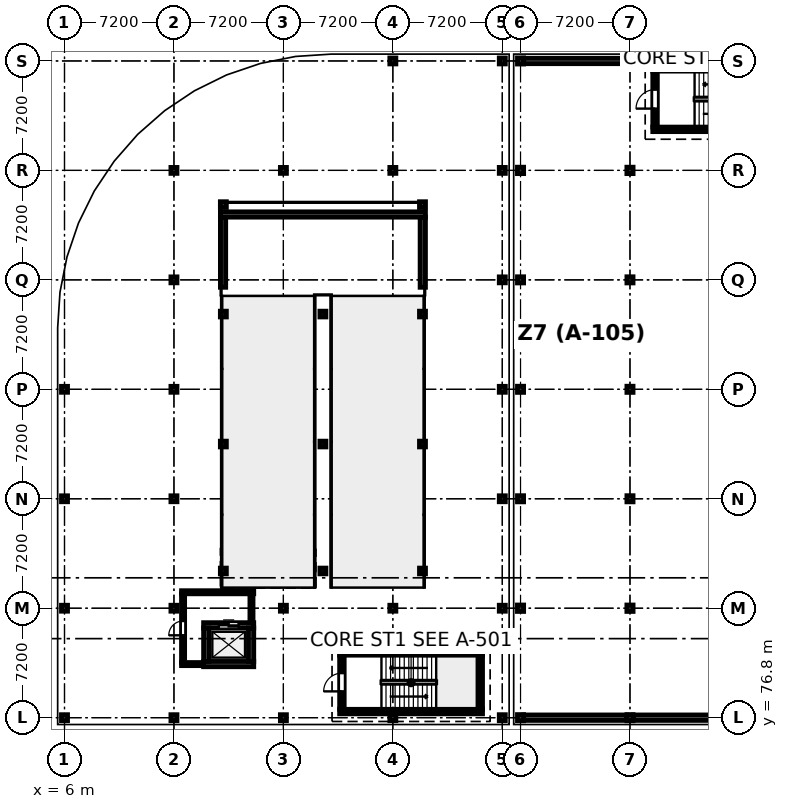
"""IFC4 building model, lengths in metres.
Left out: names, types, materials, properties, quantities, classifications, styles, units other than length and angle.
Written with IfcOpenShell. Run it as: python <this file> out.ifc"""

import sys

from ifc_helpers import new_model, si_unit, direction, frame, frame_2d, origin, origin_2d, place, context, subcontext, project, spatial, rectangle, i_section, extrude, element, fill, save


model = new_model("IFC4")
c1 = context("Model", 3, precision=1e-05, world=origin(), true_north=direction((0.0, 1.0)))
c2 = subcontext(c1, "Body", "Model", "MODEL_VIEW")
j1 = project(units=[si_unit("LENGTHUNIT", "METRE"), si_unit("PLANEANGLEUNIT", "RADIAN")], contexts=[c1])
p1 = place(None, origin())
s1 = spatial("IfcSite", under=j1, at=p1, CompositionType="ELEMENT")
p2 = place(p1, origin())
s2 = spatial("IfcBuilding", under=s1, at=p2, CompositionType="ELEMENT")
p3 = place(p2, frame((0.0, 0.0, -4.5)))
s3 = spatial("IfcBuildingStorey", under=s2, at=p3, CompositionType="ELEMENT", Elevation=-4.5)
for number, where, z_axis, x_axis in (
    (1, (6.0, 76.8, 0.0), (0.0, 0.0, 1.0), (1.0, 0.0, 0.0)),
    (2, (6.0, 84.0, 0.0), (0.0, 0.0, 1.0), (1.0, 0.0, 0.0)),
    (3, (6.0, 91.2, 0.0), (0.0, 0.0, 1.0), (1.0, 0.0, 0.0)),
    (4, (6.0, 98.4, 0.0), (0.0, 0.0, 1.0), (1.0, 0.0, 0.0)),
    (5, (13.2, 76.8, 0.0), (0.0, 0.0, 1.0), (1.0, 0.0, 0.0)),
    (6, (13.2, 84.0, 0.0), (0.0, 0.0, 1.0), (1.0, 0.0, 0.0)),
    (7, (13.2, 91.2, 0.0), (0.0, 0.0, 1.0), (1.0, 0.0, 0.0)),
    (8, (13.2, 98.4, 0.0), (0.0, 0.0, 1.0), (1.0, 0.0, 0.0)),
    (9, (13.2, 105.6, 0.0), (0.0, 0.0, 1.0), (1.0, 0.0, 0.0)),
    (10, (13.2, 112.8, 0.0), (0.0, 0.0, 1.0), (1.0, 0.0, 0.0)),
    (11, (20.4, 76.8, 0.0), (0.0, 0.0, 1.0), (1.0, 0.0, 0.0)),
    (12, (20.4, 84.0, 0.0), (0.0, 0.0, 1.0), (1.0, 0.0, 0.0)),
    (13, (20.4, 112.8, 0.0), (0.0, 0.0, 1.0), (1.0, 0.0, 0.0)),
    (14, (27.6, 76.8, 0.0), (0.0, 0.0, 1.0), (1.0, 0.0, 0.0)),
    (15, (27.6, 84.0, 0.0), (0.0, 0.0, 1.0), (1.0, 0.0, 0.0)),
    (16, (27.6, 112.8, 0.0), (0.0, 0.0, 1.0), (1.0, 0.0, 0.0)),
    (17, (27.6, 120.0, 0.0), (0.0, 0.0, 1.0), (1.0, 0.0, 0.0)),
    (18, (34.8, 76.8, 0.0), (0.0, 0.0, 1.0), (1.0, 0.0, 0.0)),
    (19, (34.8, 84.0, 0.0), (0.0, 0.0, 1.0), (1.0, 0.0, 0.0)),
    (20, (34.8, 91.2, 0.0), (0.0, 0.0, 1.0), (1.0, 0.0, 0.0)),
    (21, (34.8, 98.4, 0.0), (0.0, 0.0, 1.0), (1.0, 0.0, 0.0)),
    (22, (34.8, 105.6, 0.0), (0.0, 0.0, 1.0), (1.0, 0.0, 0.0)),
    (23, (34.8, 112.8, 0.0), (0.0, 0.0, 1.0), (1.0, 0.0, 0.0)),
    (24, (34.8, 120.0, 0.0), (0.0, 0.0, 1.0), (1.0, 0.0, 0.0)),
):
    element("IfcColumn", number, at=place(p3, frame(where, z_axis=z_axis, x_axis=x_axis)), inside=s3, PredefinedType="COLUMN", context=c2, shape_type="SweptSolid", body=[
        extrude(i_section(OverallWidth=0.399, OverallDepth=0.394, WebThickness=0.023, FlangeThickness=0.037, FilletRadius=0.015, at=origin_2d()), origin(), (0.0, 0.0, 1.0), 4.5),
    ])
for number, where, z_axis, x_axis in (
    (25, (16.45, 86.45, 0.0), (0.0, 0.0, 1.0), (1.0, 0.0, 0.0)),
    (26, (23.0, 86.45, 0.0), (0.0, 0.0, 1.0), (1.0, 0.0, 0.0)),
    (27, (29.55, 86.45, 0.0), (0.0, 0.0, 1.0), (1.0, 0.0, 0.0)),
    (28, (16.45, 94.8, 0.0), (0.0, 0.0, 1.0), (1.0, 0.0, 0.0)),
    (29, (23.0, 94.8, 0.0), (0.0, 0.0, 1.0), (1.0, 0.0, 0.0)),
    (30, (29.55, 94.8, 0.0), (0.0, 0.0, 1.0), (1.0, 0.0, 0.0)),
    (31, (16.45, 103.35, 0.0), (0.0, 0.0, 1.0), (1.0, 0.0, 0.0)),
    (32, (23.0, 103.35, 0.0), (0.0, 0.0, 1.0), (1.0, 0.0, 0.0)),
    (33, (29.55, 103.35, 0.0), (0.0, 0.0, 1.0), (1.0, 0.0, 0.0)),
    (34, (16.45, 110.55, 0.0), (0.0, 0.0, 1.0), (1.0, 0.0, 0.0)),
    (35, (29.55, 110.55, 0.0), (0.0, 0.0, 1.0), (1.0, 0.0, 0.0)),
):
    element("IfcColumn", number, at=place(p3, frame(where, z_axis=z_axis, x_axis=x_axis)), inside=s3, PredefinedType="COLUMN", context=c2, shape_type="SweptSolid", body=[
        extrude(i_section(OverallWidth=0.396, OverallDepth=0.381, WebThickness=0.019, FlangeThickness=0.03, FilletRadius=0.015, at=origin_2d()), origin(), (0.0, 0.0, 1.0), 4.5),
    ])
p4 = place(p3, frame((36.0, 76.8, 0.0), z_axis=(0.0, 0.0, 1.0), x_axis=(1.0, 0.0, 0.0)))
e36 = element("IfcColumn", 36, at=p4, inside=s3, PredefinedType="COLUMN", context=c2, shape_type="SweptSolid", body=[
    extrude(i_section(OverallWidth=0.404, OverallDepth=0.406, WebThickness=0.027, FlangeThickness=0.044, FilletRadius=0.015, at=origin_2d()), origin(), (0.0, 0.0, 1.0), 4.5),
])
p5 = place(p3, frame((36.0, 84.0, 0.0), z_axis=(0.0, 0.0, 1.0), x_axis=(1.0, 0.0, 0.0)))
e37 = element("IfcColumn", 37, at=p5, inside=s3, PredefinedType="COLUMN", context=c2, shape_type="SweptSolid", body=[
    extrude(i_section(OverallWidth=0.409, OverallDepth=0.424, WebThickness=0.033, FlangeThickness=0.052, FilletRadius=0.015, at=origin_2d()), origin(), (0.0, 0.0, 1.0), 4.5),
])
for number, where, z_axis, x_axis in (
    (38, (36.0, 91.2, 0.0), (0.0, 0.0, 1.0), (1.0, 0.0, 0.0)),
    (39, (36.0, 98.4, 0.0), (0.0, 0.0, 1.0), (1.0, 0.0, 0.0)),
    (40, (36.0, 105.6, 0.0), (0.0, 0.0, 1.0), (1.0, 0.0, 0.0)),
):
    element("IfcColumn", number, at=place(p3, frame(where, z_axis=z_axis, x_axis=x_axis)), inside=s3, PredefinedType="COLUMN", context=c2, shape_type="SweptSolid", body=[
        extrude(i_section(OverallWidth=0.404, OverallDepth=0.406, WebThickness=0.027, FlangeThickness=0.044, FilletRadius=0.015, at=origin_2d()), origin(), (0.0, 0.0, 1.0), 4.5),
    ])
p6 = place(p3, frame((36.0, 112.8, 0.0), z_axis=(0.0, 0.0, 1.0), x_axis=(1.0, 0.0, 0.0)))
e41 = element("IfcColumn", 41, at=p6, inside=s3, PredefinedType="COLUMN", context=c2, shape_type="SweptSolid", body=[
    extrude(i_section(OverallWidth=0.409, OverallDepth=0.424, WebThickness=0.033, FlangeThickness=0.052, FilletRadius=0.015, at=origin_2d()), origin(), (0.0, 0.0, 1.0), 4.5),
])
for number, where, z_axis, x_axis in (
    (42, (36.0, 120.0, 0.0), (0.0, 0.0, 1.0), (1.0, 0.0, 0.0)),
    (43, (43.2, 76.8, 0.0), (0.0, 0.0, 1.0), (1.0, 0.0, 0.0)),
):
    element("IfcColumn", number, at=place(p3, frame(where, z_axis=z_axis, x_axis=x_axis)), inside=s3, PredefinedType="COLUMN", context=c2, shape_type="SweptSolid", body=[
        extrude(i_section(OverallWidth=0.404, OverallDepth=0.406, WebThickness=0.027, FlangeThickness=0.044, FilletRadius=0.015, at=origin_2d()), origin(), (0.0, 0.0, 1.0), 4.5),
    ])
p7 = place(p3, frame((43.2, 84.0, 0.0), z_axis=(0.0, 0.0, 1.0), x_axis=(1.0, 0.0, 0.0)))
e44 = element("IfcColumn", 44, at=p7, inside=s3, PredefinedType="COLUMN", context=c2, shape_type="SweptSolid", body=[
    extrude(i_section(OverallWidth=0.409, OverallDepth=0.424, WebThickness=0.033, FlangeThickness=0.052, FilletRadius=0.015, at=origin_2d()), origin(), (0.0, 0.0, 1.0), 4.5),
])
for number, where, z_axis, x_axis in (
    (45, (43.2, 91.2, 0.0), (0.0, 0.0, 1.0), (1.0, 0.0, 0.0)),
    (46, (43.2, 98.4, 0.0), (0.0, 0.0, 1.0), (1.0, 0.0, 0.0)),
    (47, (43.2, 105.6, 0.0), (0.0, 0.0, 1.0), (1.0, 0.0, 0.0)),
):
    element("IfcColumn", number, at=place(p3, frame(where, z_axis=z_axis, x_axis=x_axis)), inside=s3, PredefinedType="COLUMN", context=c2, shape_type="SweptSolid", body=[
        extrude(i_section(OverallWidth=0.404, OverallDepth=0.406, WebThickness=0.027, FlangeThickness=0.044, FilletRadius=0.015, at=origin_2d()), origin(), (0.0, 0.0, 1.0), 4.5),
    ])
p8 = place(p3, frame((43.2, 112.8, 0.0), z_axis=(0.0, 0.0, 1.0), x_axis=(1.0, 0.0, 0.0)))
e48 = element("IfcColumn", 48, at=p8, inside=s3, PredefinedType="COLUMN", context=c2, shape_type="SweptSolid", body=[
    extrude(i_section(OverallWidth=0.409, OverallDepth=0.424, WebThickness=0.033, FlangeThickness=0.052, FilletRadius=0.015, at=origin_2d()), origin(), (0.0, 0.0, 1.0), 4.5),
])
p9 = place(p3, frame((43.2, 120.0, 0.0), z_axis=(0.0, 0.0, 1.0), x_axis=(1.0, 0.0, 0.0)))
e49 = element("IfcColumn", 49, at=p9, inside=s3, PredefinedType="COLUMN", context=c2, shape_type="SweptSolid", body=[
    extrude(i_section(OverallWidth=0.404, OverallDepth=0.406, WebThickness=0.027, FlangeThickness=0.044, FilletRadius=0.015, at=origin_2d()), origin(), (0.0, 0.0, 1.0), 4.5),
])
for number, where, z_axis, x_axis in (
    (50, (16.43, 105.11, 0.0), (0.0, 0.0, 1.0), (0.0, 1.0, 0.0)),
    (51, (29.57, 105.11, 0.0), (0.0, 0.0, 1.0), (0.0, 1.0, 0.0)),
):
    element("IfcWall", number, at=place(p3, frame(where, z_axis=z_axis, x_axis=x_axis)), inside=s3, PredefinedType="SHEAR", context=c2, shape_type="SweptSolid", body=[
        extrude(rectangle(XDim=4.615, YDim=0.35, at=frame_2d((2.308, 0.0))), origin(), (0.0, 0.0, 1.0), 1.97),
    ])
p10 = place(p3, frame((16.255, 109.9, 0.0), z_axis=(0.0, 0.0, 1.0), x_axis=(1.0, 0.0, 0.0)))
e52 = element("IfcWall", 52, at=p10, inside=s3, PredefinedType="SHEAR", context=c2, shape_type="SweptSolid", body=[
    extrude(rectangle(XDim=13.49, YDim=0.35, at=frame_2d((6.745, 0.0))), origin(), (0.0, 0.0, 1.0), 1.97),
])
for number, where, z_axis, x_axis in (
    (53, (36.209, 120.0, 0.0), (0.0, 0.0, 1.0), (1.0, 0.0, 0.0)),
    (54, (42.991, 76.8, 0.0), (0.0, 0.0, 1.0), (-1.0, 0.0, 0.0)),
    (55, (43.409, 120.0, 0.0), (0.0, 0.0, 1.0), (1.0, 0.0, 0.0)),
    (56, (50.191, 76.8, 0.0), (0.0, 0.0, 1.0), (-1.0, 0.0, 0.0)),
):
    element("IfcWall", number, at=place(p3, frame(where, z_axis=z_axis, x_axis=x_axis)), inside=s3, PredefinedType="SOLIDWALL", context=c2, shape_type="SweptSolid", body=[
        extrude(rectangle(XDim=6.782, YDim=0.36, at=frame_2d((3.391, 0.0))), origin(), (0.0, 0.0, 1.0), 3.448),
    ])
for number, where, z_axis, x_axis in (
    (57, (33.5, 77.2, 0.0), (0.0, 0.0, 1.0), (-1.0, 0.0, 0.0)),
    (58, (24.1, 81.06, 0.0), (0.0, 0.0, 1.0), (1.0, 0.0, 0.0)),
):
    element("IfcWall", number, at=place(p3, frame(where, z_axis=z_axis, x_axis=x_axis)), inside=s3, PredefinedType="SOLIDWALL", context=c2, shape_type="SweptSolid", body=[
        extrude(rectangle(XDim=9.4, YDim=0.3, at=frame_2d((4.7, 0.0))), origin(), (0.0, 0.0, 1.0), 4.25),
    ])
p11 = place(p3, frame((24.25, 77.35, 0.0), z_axis=(0.0, 0.0, 1.0), x_axis=(0.0, 1.0, 0.0)))
e59 = element("IfcWall", 59, at=p11, inside=s3, PredefinedType="SOLIDWALL", context=c2, shape_type="SweptSolid", body=[
    extrude(rectangle(XDim=3.56, YDim=0.3, at=frame_2d((1.78, 0.0))), origin(), (0.0, 0.0, 1.0), 4.25),
])
p12 = place(p11, frame((1.18, 0.0, 0.0)))
e60 = element("IfcOpeningElement", 60, at=p12, cuts=e59, PredefinedType="OPENING", context=c2, shape_type="SweptSolid", body=[
    extrude(rectangle(XDim=1.2, YDim=2.2, at=frame_2d((0.6, 1.1))), frame((0.0, 0.16, 0.0), z_axis=(0.0, -1.0, 0.0), x_axis=(1.0, 0.0, 0.0)), (0.0, 0.0, 1.0), 0.32),
])
p13 = place(p3, frame((33.35, 80.91, 0.0), z_axis=(0.0, 0.0, 1.0), x_axis=(0.0, -1.0, 0.0)))
e61 = element("IfcWall", 61, at=p13, inside=s3, PredefinedType="SOLIDWALL", context=c2, shape_type="SweptSolid", body=[
    extrude(rectangle(XDim=3.56, YDim=0.3, at=frame_2d((1.78, 0.0))), origin(), (0.0, 0.0, 1.0), 4.25),
])
for number, where, z_axis, x_axis in (
    (62, (54.1, 115.5, 0.0), (0.0, 0.0, 1.0), (-1.0, 0.0, 0.0)),
    (63, (44.7, 119.48, 0.0), (0.0, 0.0, 1.0), (1.0, 0.0, 0.0)),
):
    element("IfcWall", number, at=place(p3, frame(where, z_axis=z_axis, x_axis=x_axis)), inside=s3, PredefinedType="SOLIDWALL", context=c2, shape_type="SweptSolid", body=[
        extrude(rectangle(XDim=9.4, YDim=0.3, at=frame_2d((4.7, 0.0))), origin(), (0.0, 0.0, 1.0), 4.22),
    ])
p14 = place(p3, frame((44.85, 115.65, 0.0), z_axis=(0.0, 0.0, 1.0), x_axis=(0.0, 1.0, 0.0)))
e64 = element("IfcWall", 64, at=p14, inside=s3, PredefinedType="SOLIDWALL", context=c2, shape_type="SweptSolid", body=[
    extrude(rectangle(XDim=3.68, YDim=0.3, at=frame_2d((1.84, 0.0))), origin(), (0.0, 0.0, 1.0), 4.22),
])
p15 = place(p14, frame((1.215, 0.0, 0.0)))
e65 = element("IfcOpeningElement", 65, at=p15, cuts=e64, PredefinedType="OPENING", context=c2, shape_type="SweptSolid", body=[
    extrude(rectangle(XDim=1.25, YDim=2.2, at=frame_2d((0.625, 1.1))), frame((0.0, 0.16, 0.0), z_axis=(0.0, -1.0, 0.0), x_axis=(1.0, 0.0, 0.0)), (0.0, 0.0, 1.0), 0.32),
])
p16 = place(p3, frame((18.45, 80.325, 0.0), z_axis=(0.0, 0.0, 1.0), x_axis=(-1.0, 0.0, 0.0)))
e66 = element("IfcWall", 66, at=p16, inside=s3, PredefinedType="SHEAR", context=c2, shape_type="SweptSolid", body=[
    extrude(rectangle(XDim=3.3, YDim=0.35, at=frame_2d((1.65, 0.0))), origin(), (0.0, 0.0, 1.0), 4.25),
])
p17 = place(p3, frame((15.15, 82.875, 0.0), z_axis=(0.0, 0.0, 1.0), x_axis=(1.0, 0.0, 0.0)))
e67 = element("IfcWall", 67, at=p17, inside=s3, PredefinedType="SHEAR", context=c2, shape_type="SweptSolid", body=[
    extrude(rectangle(XDim=3.3, YDim=0.35, at=frame_2d((1.65, 0.0))), origin(), (0.0, 0.0, 1.0), 4.25),
])
p18 = place(p17, frame((1.0, 0.0, 0.0)))
e68 = element("IfcOpeningElement", 68, at=p18, cuts=e67, PredefinedType="OPENING", context=c2, shape_type="SweptSolid", body=[
    extrude(rectangle(XDim=1.3, YDim=2.2, at=frame_2d((0.65, 1.1))), frame((0.0, 0.185, 0.0), z_axis=(0.0, -1.0, 0.0), x_axis=(1.0, 0.0, 0.0)), (0.0, 0.0, 1.0), 0.37),
])
for number, where, z_axis, x_axis in (
    (69, (15.325, 80.5, 0.0), (0.0, 0.0, 1.0), (0.0, 1.0, 0.0)),
    (70, (18.275, 82.7, 0.0), (0.0, 0.0, 1.0), (0.0, -1.0, 0.0)),
):
    element("IfcWall", number, at=place(p3, frame(where, z_axis=z_axis, x_axis=x_axis)), inside=s3, PredefinedType="SHEAR", context=c2, shape_type="SweptSolid", body=[
        extrude(rectangle(XDim=2.2, YDim=0.35, at=frame_2d((1.1, 0.0))), origin(), (0.0, 0.0, 1.0), 4.25),
    ])
p19 = place(p3, frame((13.698, 85.05, 0.0), z_axis=(0.0, 0.0, 1.0), x_axis=(1.0, 0.0, 0.0)))
e71 = element("IfcWall", 71, at=p19, inside=s3, PredefinedType="PARTITIONING", context=c2, shape_type="SweptSolid", body=[
    extrude(rectangle(XDim=4.752, YDim=0.205, at=frame_2d((2.376, 0.0))), origin(), (0.0, 0.0, 1.0), 3.618),
])
p20 = place(p3, frame((15.148, 80.325, 0.0), z_axis=(0.0, 0.0, 1.0), x_axis=(-1.0, 0.0, 0.0)))
e72 = element("IfcWall", 72, at=p20, inside=s3, PredefinedType="PARTITIONING", context=c2, shape_type="SweptSolid", body=[
    extrude(rectangle(XDim=1.45, YDim=0.205, at=frame_2d((0.725, 0.0))), origin(), (0.0, 0.0, 1.0), 3.618),
])
p21 = place(p3, frame((13.8, 80.43, 0.0), z_axis=(0.0, 0.0, 1.0), x_axis=(0.0, 1.0, 0.0)))
e73 = element("IfcWall", 73, at=p21, inside=s3, PredefinedType="PARTITIONING", context=c2, shape_type="SweptSolid", body=[
    extrude(rectangle(XDim=4.516, YDim=0.205, at=frame_2d((2.258, 0.0))), origin(), (0.0, 0.0, 1.0), 3.618),
])
p22 = place(p21, frame((1.788, 0.0, 0.0)))
e74 = element("IfcOpeningElement", 74, at=p22, cuts=e73, PredefinedType="OPENING", context=c2, shape_type="SweptSolid", body=[
    extrude(rectangle(XDim=0.94, YDim=2.1, at=frame_2d((0.47, 1.05))), frame((0.0, 0.113, 0.0), z_axis=(0.0, -1.0, 0.0), x_axis=(1.0, 0.0, 0.0)), (0.0, 0.0, 1.0), 0.225),
])
p23 = place(p3, frame((18.3, 84.946, 0.0), z_axis=(0.0, 0.0, 1.0), x_axis=(0.0, -1.0, 0.0)))
e75 = element("IfcWall", 75, at=p23, inside=s3, PredefinedType="PARTITIONING", context=c2, shape_type="SweptSolid", body=[
    extrude(rectangle(XDim=1.894, YDim=0.205, at=frame_2d((0.947, 0.0))), origin(), (0.0, 0.0, 1.0), 3.618),
])
p24 = place(p12, origin())
e76 = element("IfcDoor", 76, at=p24, inside=s3, OperationType="SINGLE_SWING_LEFT", PredefinedType="DOOR", context=c2, shape_type="SweptSolid", body=[
    extrude(rectangle(XDim=1.2, YDim=2.2, at=frame_2d((0.6, 1.1))), frame((0.0, 0.025, 0.0), z_axis=(0.0, -1.0, 0.0), x_axis=(1.0, 0.0, 0.0)), (0.0, 0.0, 1.0), 0.05),
])
fill(e60, e76)
p25 = place(p15, origin())
e77 = element("IfcDoor", 77, at=p25, inside=s3, OperationType="SINGLE_SWING_LEFT", PredefinedType="DOOR", context=c2, shape_type="SweptSolid", body=[
    extrude(rectangle(XDim=1.25, YDim=2.2, at=frame_2d((0.625, 1.1))), frame((0.0, 0.025, 0.0), z_axis=(0.0, -1.0, 0.0), x_axis=(1.0, 0.0, 0.0)), (0.0, 0.0, 1.0), 0.05),
])
fill(e65, e77)
p26 = place(p18, origin())
e78 = element("IfcDoor", 78, at=p26, inside=s3, OperationType="DOUBLE_DOOR_SLIDING", PredefinedType="DOOR", context=c2, shape_type="SweptSolid", body=[
    extrude(rectangle(XDim=1.3, YDim=2.2, at=frame_2d((0.65, 1.1))), frame((0.0, 0.025, 0.0), z_axis=(0.0, -1.0, 0.0), x_axis=(1.0, 0.0, 0.0)), (0.0, 0.0, 1.0), 0.05),
])
fill(e68, e78)
p27 = place(p22, origin())
e79 = element("IfcDoor", 79, at=p27, inside=s3, OperationType="SINGLE_SWING_LEFT", PredefinedType="DOOR", context=c2, shape_type="SweptSolid", body=[
    extrude(rectangle(XDim=0.94, YDim=2.1, at=frame_2d((0.47, 1.05))), frame((0.0, 0.025, 0.0), z_axis=(0.0, -1.0, 0.0), x_axis=(1.0, 0.0, 0.0)), (0.0, 0.0, 1.0), 0.05),
])
fill(e74, e79)
save(model, sys.argv[1])
